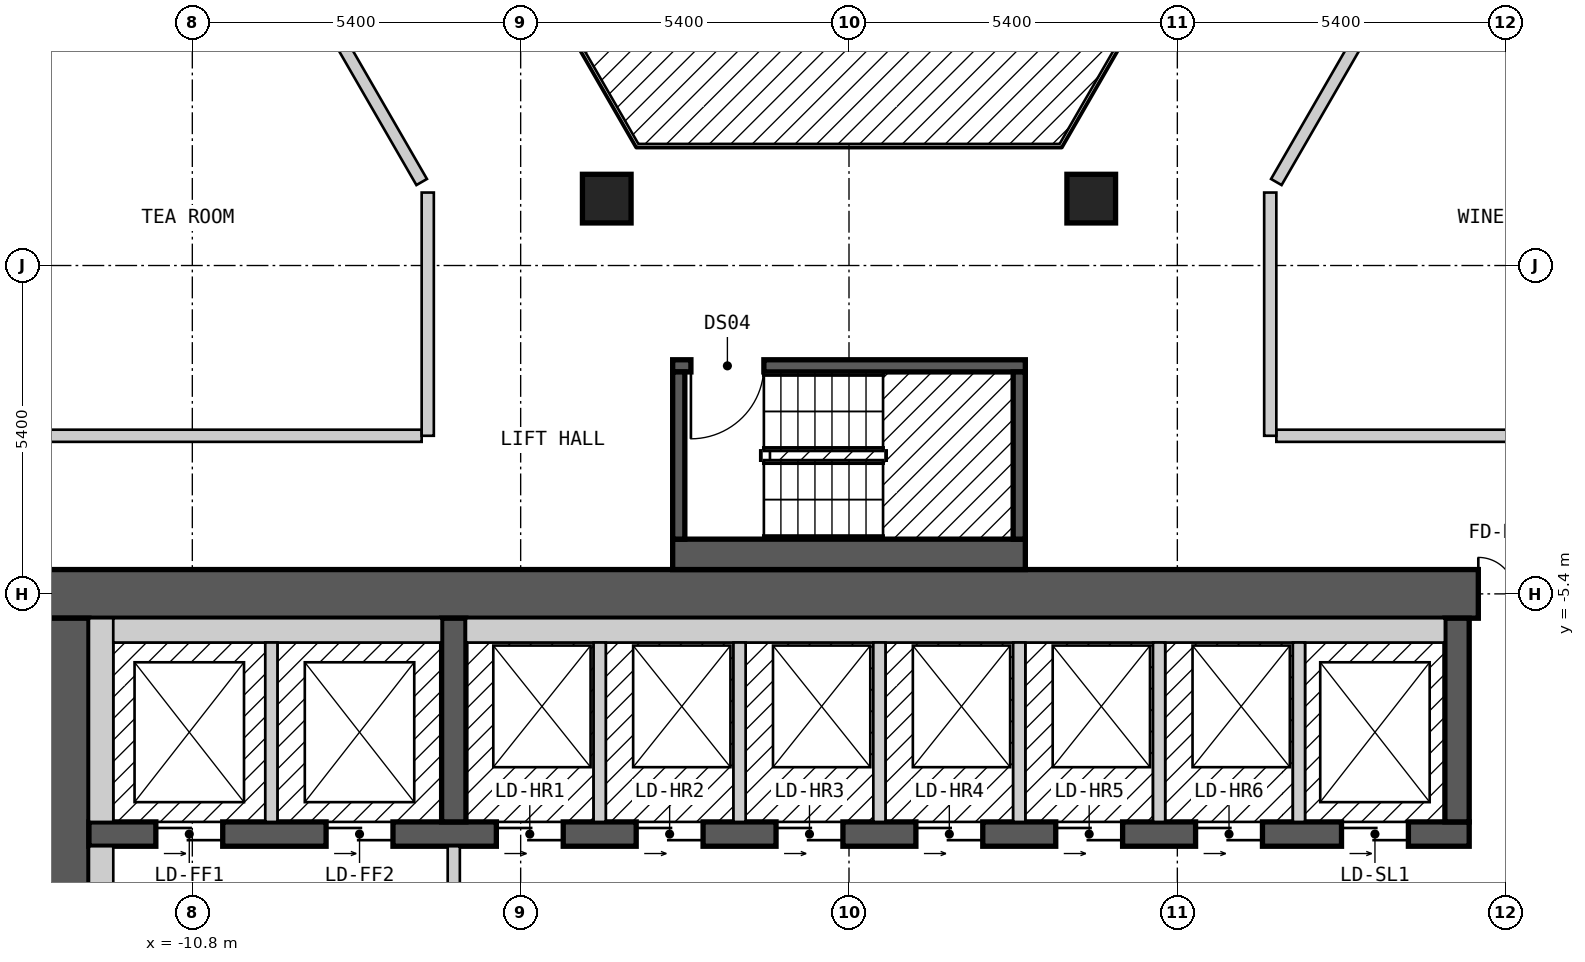
"""IFC4 building model, lengths in metres.
Left out: names, types, materials, properties, quantities, classifications, styles, units other than length and angle.
Written with IfcOpenShell. Run it as: python <this file> out.ifc"""

import sys

from ifc_helpers import new_model, si_unit, direction, frame, frame_2d, origin, origin_2d, place, context, subcontext, project, spatial, rectangle, extrude, element, fill, save


model = new_model("IFC4")
c1 = context("Model", 3, precision=1e-05, world=origin(), true_north=direction((0.0, 1.0)))
c2 = subcontext(c1, "Body", "Model", "MODEL_VIEW")
j1 = project(units=[si_unit("LENGTHUNIT", "METRE"), si_unit("PLANEANGLEUNIT", "RADIAN")], contexts=[c1])
p1 = place(None, origin())
s1 = spatial("IfcSite", under=j1, at=p1, CompositionType="ELEMENT")
p2 = place(p1, origin())
s2 = spatial("IfcBuilding", under=s1, at=p2, CompositionType="ELEMENT")
p3 = place(p2, frame((0.0, 0.0, 129.6)))
s3 = spatial("IfcBuildingStorey", under=s2, at=p3, CompositionType="ELEMENT", Elevation=129.6)
for number, where, z_axis, x_axis in (
    (1, (3.984, 1.1, 0.0), (0.0, 0.0, 1.0), (1.0, 0.0, 0.0)),
    (2, (-3.984, 1.1, 0.0), (0.0, 0.0, 1.0), (1.0, 0.0, 0.0)),
):
    element("IfcColumn", number, at=place(p3, frame(where, z_axis=z_axis, x_axis=x_axis)), inside=s3, PredefinedType="COLUMN", context=c2, shape_type="SweptSolid", body=[
        extrude(rectangle(XDim=0.8, YDim=0.8, at=origin_2d()), origin(), (0.0, 0.0, 1.0), 3.0),
    ])
p4 = place(p3, frame((-13.3, -5.4, 0.0), z_axis=(0.0, 0.0, 1.0), x_axis=(1.0, 0.0, 0.0)))
e3 = element("IfcWall", 3, at=p4, inside=s3, PredefinedType="SHEAR", context=c2, shape_type="SweptSolid", body=[
    extrude(rectangle(XDim=26.6, YDim=0.8, at=frame_2d((13.3, 0.0))), origin(), (0.0, 0.0, 1.0), 2.7),
])
p5 = place(p4, frame((23.65, 0.0, 0.0)))
e4 = element("IfcOpeningElement", 4, at=p5, cuts=e3, PredefinedType="OPENING", context=c2, shape_type="SweptSolid", body=[
    extrude(rectangle(XDim=1.2, YDim=2.1, at=frame_2d((0.6, 1.05))), frame((0.0, 0.41, 0.0), z_axis=(0.0, -1.0, 0.0), x_axis=(1.0, 0.0, 0.0)), (0.0, 0.0, 1.0), 0.82),
])
p6 = place(p3, frame((-12.9, -18.2, 0.0), z_axis=(0.0, 0.0, 1.0), x_axis=(0.0, 1.0, 0.0)))
e5 = element("IfcWall", 5, at=p6, inside=s3, PredefinedType="SHEAR", context=c2, shape_type="SweptSolid", body=[
    extrude(rectangle(XDim=12.4, YDim=0.8, at=frame_2d((6.2, 0.0))), origin(), (0.0, 0.0, 1.0), 2.7),
])
p7 = place(p6, frame((4.0, 0.0, 0.0)))
e6 = element("IfcOpeningElement", 6, at=p7, cuts=e5, PredefinedType="OPENING", context=c2, shape_type="SweptSolid", body=[
    extrude(rectangle(XDim=1.2, YDim=2.1, at=frame_2d((0.6, 1.05))), frame((0.0, 0.41, 0.0), z_axis=(0.0, -1.0, 0.0), x_axis=(1.0, 0.0, 0.0)), (0.0, 0.0, 1.0), 0.82),
])
p8 = place(p3, frame((-12.5, -9.35, 0.0), z_axis=(0.0, 0.0, 1.0), x_axis=(1.0, 0.0, 0.0)))
e7 = element("IfcWall", 7, at=p8, inside=s3, PredefinedType="SHEAR", context=c2, shape_type="SweptSolid", body=[
    extrude(rectangle(XDim=22.7, YDim=0.4, at=frame_2d((11.35, 0.0))), origin(), (0.0, 0.0, 1.0), 2.7),
])
p9 = place(p8, frame((1.1, 0.0, 0.0)))
e8 = element("IfcOpeningElement", 8, at=p9, cuts=e7, PredefinedType="OPENING", context=c2, shape_type="SweptSolid", body=[
    extrude(rectangle(XDim=1.1, YDim=2.1, at=frame_2d((0.55, 1.05))), frame((0.0, 0.21, 0.0), z_axis=(0.0, -1.0, 0.0), x_axis=(1.0, 0.0, 0.0)), (0.0, 0.0, 1.0), 0.42),
])
p10 = place(p8, frame((3.9, 0.0, 0.0)))
e9 = element("IfcOpeningElement", 9, at=p10, cuts=e7, PredefinedType="OPENING", context=c2, shape_type="SweptSolid", body=[
    extrude(rectangle(XDim=1.1, YDim=2.1, at=frame_2d((0.55, 1.05))), frame((0.0, 0.21, 0.0), z_axis=(0.0, -1.0, 0.0), x_axis=(1.0, 0.0, 0.0)), (0.0, 0.0, 1.0), 0.42),
])
p11 = place(p8, frame((6.7, 0.0, 0.0)))
e10 = element("IfcOpeningElement", 10, at=p11, cuts=e7, PredefinedType="OPENING", context=c2, shape_type="SweptSolid", body=[
    extrude(rectangle(XDim=1.1, YDim=2.1, at=frame_2d((0.55, 1.05))), frame((0.0, 0.21, 0.0), z_axis=(0.0, -1.0, 0.0), x_axis=(1.0, 0.0, 0.0)), (0.0, 0.0, 1.0), 0.42),
])
p12 = place(p8, frame((9.0, 0.0, 0.0)))
e11 = element("IfcOpeningElement", 11, at=p12, cuts=e7, PredefinedType="OPENING", context=c2, shape_type="SweptSolid", body=[
    extrude(rectangle(XDim=1.1, YDim=2.1, at=frame_2d((0.55, 1.05))), frame((0.0, 0.21, 0.0), z_axis=(0.0, -1.0, 0.0), x_axis=(1.0, 0.0, 0.0)), (0.0, 0.0, 1.0), 0.42),
])
p13 = place(p8, frame((11.3, 0.0, 0.0)))
e12 = element("IfcOpeningElement", 12, at=p13, cuts=e7, PredefinedType="OPENING", context=c2, shape_type="SweptSolid", body=[
    extrude(rectangle(XDim=1.1, YDim=2.1, at=frame_2d((0.55, 1.05))), frame((0.0, 0.21, 0.0), z_axis=(0.0, -1.0, 0.0), x_axis=(1.0, 0.0, 0.0)), (0.0, 0.0, 1.0), 0.42),
])
p14 = place(p8, frame((13.6, 0.0, 0.0)))
e13 = element("IfcOpeningElement", 13, at=p14, cuts=e7, PredefinedType="OPENING", context=c2, shape_type="SweptSolid", body=[
    extrude(rectangle(XDim=1.1, YDim=2.1, at=frame_2d((0.55, 1.05))), frame((0.0, 0.21, 0.0), z_axis=(0.0, -1.0, 0.0), x_axis=(1.0, 0.0, 0.0)), (0.0, 0.0, 1.0), 0.42),
])
p15 = place(p8, frame((15.9, 0.0, 0.0)))
e14 = element("IfcOpeningElement", 14, at=p15, cuts=e7, PredefinedType="OPENING", context=c2, shape_type="SweptSolid", body=[
    extrude(rectangle(XDim=1.1, YDim=2.1, at=frame_2d((0.55, 1.05))), frame((0.0, 0.21, 0.0), z_axis=(0.0, -1.0, 0.0), x_axis=(1.0, 0.0, 0.0)), (0.0, 0.0, 1.0), 0.42),
])
p16 = place(p8, frame((18.2, 0.0, 0.0)))
e15 = element("IfcOpeningElement", 15, at=p16, cuts=e7, PredefinedType="OPENING", context=c2, shape_type="SweptSolid", body=[
    extrude(rectangle(XDim=1.1, YDim=2.1, at=frame_2d((0.55, 1.05))), frame((0.0, 0.21, 0.0), z_axis=(0.0, -1.0, 0.0), x_axis=(1.0, 0.0, 0.0)), (0.0, 0.0, 1.0), 0.42),
])
p17 = place(p8, frame((20.6, 0.0, 0.0)))
e16 = element("IfcOpeningElement", 16, at=p17, cuts=e7, PredefinedType="OPENING", context=c2, shape_type="SweptSolid", body=[
    extrude(rectangle(XDim=1.1, YDim=2.1, at=frame_2d((0.55, 1.05))), frame((0.0, 0.21, 0.0), z_axis=(0.0, -1.0, 0.0), x_axis=(1.0, 0.0, 0.0)), (0.0, 0.0, 1.0), 0.42),
])
for number, where, z_axis, x_axis in (
    (17, (-6.5, -9.15, 0.0), (0.0, 0.0, 1.0), (0.0, 1.0, 0.0)),
    (18, (10.0, -9.15, 0.0), (0.0, 0.0, 1.0), (0.0, 1.0, 0.0)),
):
    element("IfcWall", number, at=place(p3, frame(where, z_axis=z_axis, x_axis=x_axis)), inside=s3, PredefinedType="SHEAR", context=c2, shape_type="SweptSolid", body=[
        extrude(rectangle(XDim=3.35, YDim=0.4, at=frame_2d((1.675, 0.0))), origin(), (0.0, 0.0, 1.0), 2.7),
    ])
p18 = place(p3, frame((-2.9, -4.75, 0.0), z_axis=(0.0, 0.0, 1.0), x_axis=(1.0, 0.0, 0.0)))
e19 = element("IfcWall", 19, at=p18, inside=s3, PredefinedType="SOLIDWALL", context=c2, shape_type="SweptSolid", body=[
    extrude(rectangle(XDim=5.8, YDim=0.5, at=frame_2d((2.9, 0.0))), origin(), (0.0, 0.0, 1.0), 2.7),
])
p19 = place(p3, frame((-2.9, -1.65, 0.0), z_axis=(0.0, 0.0, 1.0), x_axis=(1.0, 0.0, 0.0)))
e20 = element("IfcWall", 20, at=p19, inside=s3, PredefinedType="SOLIDWALL", context=c2, shape_type="SweptSolid", body=[
    extrude(rectangle(XDim=5.8, YDim=0.2, at=frame_2d((2.9, 0.0))), origin(), (0.0, 0.0, 1.0), 2.7),
])
p20 = place(p19, frame((0.3, 0.0, 0.0)))
e21 = element("IfcOpeningElement", 21, at=p20, cuts=e20, PredefinedType="OPENING", context=c2, shape_type="SweptSolid", body=[
    extrude(rectangle(XDim=1.2, YDim=2.1, at=frame_2d((0.6, 1.05))), frame((0.0, 0.11, 0.0), z_axis=(0.0, -1.0, 0.0), x_axis=(1.0, 0.0, 0.0)), (0.0, 0.0, 1.0), 0.22),
])
for number, where, z_axis, x_axis in (
    (22, (-2.8, -4.5, 0.0), (0.0, 0.0, 1.0), (0.0, 1.0, 0.0)),
    (23, (2.8, -4.5, 0.0), (0.0, 0.0, 1.0), (0.0, 1.0, 0.0)),
):
    element("IfcWall", number, at=place(p3, frame(where, z_axis=z_axis, x_axis=x_axis)), inside=s3, PredefinedType="SOLIDWALL", context=c2, shape_type="SweptSolid", body=[
        extrude(rectangle(XDim=2.75, YDim=0.2, at=frame_2d((1.375, 0.0))), origin(), (0.0, 0.0, 1.0), 2.7),
    ])
p21 = place(p3, frame((-10.796, 7.9, 0.0), z_axis=(0.0, 0.0, 1.0), x_axis=(0.499954271211, -0.866051803703, 0.0)))
e24 = element("IfcWall", 24, at=p21, inside=s3, PredefinedType="PARTITIONING", context=c2, shape_type="SweptSolid", body=[
    extrude(rectangle(XDim=7.536, YDim=0.2, at=frame_2d((3.768, 0.0))), origin(), (0.0, 0.0, 1.0), 2.7),
])
p22 = place(p3, frame((7.967, 13.0, 0.0), z_axis=(0.0, 0.0, 1.0), x_axis=(0.50003774998, -0.866003607726, 0.0)))
e25 = element("IfcWall", 25, at=p22, inside=s3, PredefinedType="PARTITIONING", context=c2, shape_type="SweptSolid", body=[
    extrude(rectangle(XDim=14.433, YDim=0.2, at=frame_2d((7.217, 0.0))), origin(), (0.0, 0.0, 1.0), 2.7),
])
p23 = place(p22, frame((6.824, 0.0, 0.0)))
e26 = element("IfcOpeningElement", 26, at=p23, cuts=e25, PredefinedType="OPENING", context=c2, shape_type="SweptSolid", body=[
    extrude(rectangle(XDim=0.9, YDim=2.1, at=frame_2d((0.45, 1.05))), frame((0.0, 0.11, 0.0), z_axis=(0.0, -1.0, 0.0), x_axis=(1.0, 0.0, 0.0)), (0.0, 0.0, 1.0), 0.22),
])
p24 = place(p3, frame((9.296, 15.1, 0.0), z_axis=(0.0, 0.0, 1.0), x_axis=(0.499974024244, -0.866040400375, 0.0)))
e27 = element("IfcWall", 27, at=p24, inside=s3, PredefinedType="PARTITIONING", context=c2, shape_type="SweptSolid", body=[
    extrude(rectangle(XDim=16.857, YDim=0.2, at=frame_2d((8.429, 0.0))), origin(), (0.0, 0.0, 1.0), 2.7),
])
p25 = place(p24, frame((5.187, 0.0, 0.0)))
e28 = element("IfcOpeningElement", 28, at=p25, cuts=e27, PredefinedType="OPENING", context=c2, shape_type="SweptSolid", body=[
    extrude(rectangle(XDim=1.0, YDim=2.1, at=frame_2d((0.5, 1.05))), frame((0.0, 0.11, 0.0), z_axis=(0.0, -1.0, 0.0), x_axis=(1.0, 0.0, 0.0)), (0.0, 0.0, 1.0), 0.22),
])
p26 = place(p3, frame((-13.395, -2.8, 0.0), z_axis=(0.0, 0.0, 1.0), x_axis=(1.0, 0.0, 0.0)))
e29 = element("IfcWall", 29, at=p26, inside=s3, PredefinedType="PARTITIONING", context=c2, shape_type="SweptSolid", body=[
    extrude(rectangle(XDim=6.367, YDim=0.2, at=frame_2d((3.184, 0.0))), origin(), (0.0, 0.0, 1.0), 2.7),
])
p27 = place(p3, frame((7.028, -2.8, 0.0), z_axis=(0.0, 0.0, 1.0), x_axis=(1.0, 0.0, 0.0)))
e30 = element("IfcWall", 30, at=p27, inside=s3, PredefinedType="PARTITIONING", context=c2, shape_type="SweptSolid", body=[
    extrude(rectangle(XDim=6.25, YDim=0.2, at=frame_2d((3.125, 0.0))), origin(), (0.0, 0.0, 1.0), 2.7),
])
p28 = place(p3, frame((7.028, 1.373, 0.0), z_axis=(0.0, 0.0, 1.0), x_axis=(0.499954271211, 0.866051803703, 0.0)))
e31 = element("IfcWall", 31, at=p28, inside=s3, PredefinedType="PARTITIONING", context=c2, shape_type="SweptSolid", body=[
    extrude(rectangle(XDim=7.536, YDim=0.2, at=frame_2d((3.768, 0.0))), origin(), (0.0, 0.0, 1.0), 2.7),
])
p29 = place(p3, frame((-15.242, 0.399, 0.0), z_axis=(0.0, 0.0, 1.0), x_axis=(0.499953615651, 0.866052182145, 0.0)))
e32 = element("IfcWall", 32, at=p29, inside=s3, PredefinedType="PARTITIONING", context=c2, shape_type="SweptSolid", body=[
    extrude(rectangle(XDim=8.777, YDim=0.2, at=frame_2d((4.388, 0.0))), origin(), (0.0, 0.0, 1.0), 2.7),
])
p30 = place(p29, frame((3.938, 0.0, 0.0)))
e33 = element("IfcOpeningElement", 33, at=p30, cuts=e32, PredefinedType="OPENING", context=c2, shape_type="SweptSolid", body=[
    extrude(rectangle(XDim=0.9, YDim=2.1, at=frame_2d((0.45, 1.05))), frame((0.0, 0.11, 0.0), z_axis=(0.0, -1.0, 0.0), x_axis=(1.0, 0.0, 0.0)), (0.0, 0.0, 1.0), 0.22),
])
p31 = place(p3, frame((-17.753, 0.45, 0.0), z_axis=(0.0, 0.0, 1.0), x_axis=(0.499988552313, 0.866032013009, 0.0)))
e34 = element("IfcWall", 34, at=p31, inside=s3, PredefinedType="PARTITIONING", context=c2, shape_type="SweptSolid", body=[
    extrude(rectangle(XDim=16.917, YDim=0.2, at=frame_2d((8.458, 0.0))), origin(), (0.0, 0.0, 1.0), 2.7),
])
p32 = place(p31, frame((10.73, 0.0, 0.0)))
e35 = element("IfcOpeningElement", 35, at=p32, cuts=e34, PredefinedType="OPENING", context=c2, shape_type="SweptSolid", body=[
    extrude(rectangle(XDim=1.0, YDim=2.1, at=frame_2d((0.5, 1.05))), frame((0.0, 0.11, 0.0), z_axis=(0.0, -1.0, 0.0), x_axis=(1.0, 0.0, 0.0)), (0.0, 0.0, 1.0), 0.22),
])
p33 = place(p31, frame((0.594, 0.0, 0.0)))
e36 = element("IfcOpeningElement", 36, at=p33, cuts=e34, PredefinedType="OPENING", context=c2, shape_type="SweptSolid", body=[
    extrude(rectangle(XDim=1.0, YDim=2.1, at=frame_2d((0.5, 1.05))), frame((0.0, 0.11, 0.0), z_axis=(0.0, -1.0, 0.0), x_axis=(1.0, 0.0, 0.0)), (0.0, 0.0, 1.0), 0.22),
])
for number, where, z_axis, x_axis in (
    (37, (6.928, -2.8, 0.0), (0.0, 0.0, 1.0), (0.0, 1.0, 0.0)),
    (38, (-6.928, -2.8, 0.0), (0.0, 0.0, 1.0), (0.0, 1.0, 0.0)),
):
    element("IfcWall", number, at=place(p3, frame(where, z_axis=z_axis, x_axis=x_axis)), inside=s3, PredefinedType="PARTITIONING", context=c2, shape_type="SweptSolid", body=[
        extrude(rectangle(XDim=4.0, YDim=0.2, at=frame_2d((2.0, 0.0))), origin(), (0.0, 0.0, 1.0), 2.7),
    ])
p34 = place(p3, frame((-12.3, -13.0, 0.0), z_axis=(0.0, 0.0, 1.0), x_axis=(0.0, 1.0, 0.0)))
e39 = element("IfcWall", 39, at=p34, inside=s3, PredefinedType="PARTITIONING", context=c2, shape_type="SweptSolid", body=[
    extrude(rectangle(XDim=3.45, YDim=0.4, at=frame_2d((1.725, 0.0))), origin(), (0.0, 0.0, 1.0), 2.7),
])
p35 = place(p3, frame((-12.3, -9.15, 0.0), z_axis=(0.0, 0.0, 1.0), x_axis=(0.0, 1.0, 0.0)))
e40 = element("IfcWall", 40, at=p35, inside=s3, PredefinedType="SOLIDWALL", context=c2, shape_type="SweptSolid", body=[
    extrude(rectangle(XDim=3.35, YDim=0.4, at=frame_2d((1.675, 0.0))), origin(), (0.0, 0.0, 1.0), 2.7),
])
p36 = place(p3, frame((-12.1, -6.0, 0.0), z_axis=(0.0, 0.0, 1.0), x_axis=(1.0, 0.0, 0.0)))
e41 = element("IfcWall", 41, at=p36, inside=s3, PredefinedType="SOLIDWALL", context=c2, shape_type="SweptSolid", body=[
    extrude(rectangle(XDim=5.4, YDim=0.4, at=frame_2d((2.7, 0.0))), origin(), (0.0, 0.0, 1.0), 2.7),
])
p37 = place(p3, frame((-9.5, -9.15, 0.0), z_axis=(0.0, 0.0, 1.0), x_axis=(0.0, 1.0, 0.0)))
e42 = element("IfcWall", 42, at=p37, inside=s3, PredefinedType="SOLIDWALL", context=c2, shape_type="SweptSolid", body=[
    extrude(rectangle(XDim=2.95, YDim=0.2, at=frame_2d((1.475, 0.0))), origin(), (0.0, 0.0, 1.0), 2.7),
])
p38 = place(p3, frame((-6.5, -14.45, 0.0), z_axis=(0.0, 0.0, 1.0), x_axis=(0.0, 1.0, 0.0)))
e43 = element("IfcWall", 43, at=p38, inside=s3, PredefinedType="PARTITIONING", context=c2, shape_type="SweptSolid", body=[
    extrude(rectangle(XDim=4.9, YDim=0.2, at=frame_2d((2.45, 0.0))), origin(), (0.0, 0.0, 1.0), 2.7),
])
p39 = place(p38, frame((3.15, 0.0, 0.0), z_axis=(0.0, 0.0, 1.0), x_axis=(-1.0, 0.0, 0.0)))
e44 = element("IfcOpeningElement", 44, at=p39, cuts=e43, PredefinedType="OPENING", context=c2, shape_type="SweptSolid", body=[
    extrude(rectangle(XDim=1.4, YDim=2.1, at=frame_2d((0.7, 1.05))), frame((0.0, 0.11, 0.0), z_axis=(0.0, -1.0, 0.0), x_axis=(1.0, 0.0, 0.0)), (0.0, 0.0, 1.0), 0.22),
])
p40 = place(p3, frame((-6.3, -6.0, 0.0), z_axis=(0.0, 0.0, 1.0), x_axis=(1.0, 0.0, 0.0)))
e45 = element("IfcWall", 45, at=p40, inside=s3, PredefinedType="SOLIDWALL", context=c2, shape_type="SweptSolid", body=[
    extrude(rectangle(XDim=16.1, YDim=0.4, at=frame_2d((8.05, 0.0))), origin(), (0.0, 0.0, 1.0), 2.7),
])
for number, where, z_axis, x_axis in (
    (46, (-4.1, -9.15, 0.0), (0.0, 0.0, 1.0), (0.0, 1.0, 0.0)),
    (47, (-1.8, -9.15, 0.0), (0.0, 0.0, 1.0), (0.0, 1.0, 0.0)),
    (48, (0.5, -9.15, 0.0), (0.0, 0.0, 1.0), (0.0, 1.0, 0.0)),
    (49, (2.8, -9.15, 0.0), (0.0, 0.0, 1.0), (0.0, 1.0, 0.0)),
    (50, (5.1, -9.15, 0.0), (0.0, 0.0, 1.0), (0.0, 1.0, 0.0)),
    (51, (7.4, -9.15, 0.0), (0.0, 0.0, 1.0), (0.0, 1.0, 0.0)),
):
    element("IfcWall", number, at=place(p3, frame(where, z_axis=z_axis, x_axis=x_axis)), inside=s3, PredefinedType="SOLIDWALL", context=c2, shape_type="SweptSolid", body=[
        extrude(rectangle(XDim=2.95, YDim=0.2, at=frame_2d((1.475, 0.0))), origin(), (0.0, 0.0, 1.0), 2.7),
    ])
p41 = place(p20, origin())
e52 = element("IfcDoor", 52, at=p41, inside=s3, OperationType="SINGLE_SWING_LEFT", PredefinedType="DOOR", context=c2, shape_type="SweptSolid", body=[
    extrude(rectangle(XDim=1.2, YDim=2.1, at=frame_2d((0.6, 1.05))), frame((0.0, 0.025, 0.0), z_axis=(0.0, -1.0, 0.0), x_axis=(1.0, 0.0, 0.0)), (0.0, 0.0, 1.0), 0.05),
])
fill(e21, e52)
p42 = place(p9, origin())
e53 = element("IfcDoor", 53, at=p42, inside=s3, OperationType="DOUBLE_DOOR_SLIDING", PredefinedType="DOOR", context=c2, shape_type="SweptSolid", body=[
    extrude(rectangle(XDim=1.1, YDim=2.1, at=frame_2d((0.55, 1.05))), frame((0.0, 0.025, 0.0), z_axis=(0.0, -1.0, 0.0), x_axis=(1.0, 0.0, 0.0)), (0.0, 0.0, 1.0), 0.05),
])
fill(e8, e53)
p43 = place(p10, origin())
e54 = element("IfcDoor", 54, at=p43, inside=s3, OperationType="DOUBLE_DOOR_SLIDING", PredefinedType="DOOR", context=c2, shape_type="SweptSolid", body=[
    extrude(rectangle(XDim=1.1, YDim=2.1, at=frame_2d((0.55, 1.05))), frame((0.0, 0.025, 0.0), z_axis=(0.0, -1.0, 0.0), x_axis=(1.0, 0.0, 0.0)), (0.0, 0.0, 1.0), 0.05),
])
fill(e9, e54)
p44 = place(p11, origin())
e55 = element("IfcDoor", 55, at=p44, inside=s3, OperationType="DOUBLE_DOOR_SLIDING", PredefinedType="DOOR", context=c2, shape_type="SweptSolid", body=[
    extrude(rectangle(XDim=1.1, YDim=2.1, at=frame_2d((0.55, 1.05))), frame((0.0, 0.025, 0.0), z_axis=(0.0, -1.0, 0.0), x_axis=(1.0, 0.0, 0.0)), (0.0, 0.0, 1.0), 0.05),
])
fill(e10, e55)
p45 = place(p12, origin())
e56 = element("IfcDoor", 56, at=p45, inside=s3, OperationType="DOUBLE_DOOR_SLIDING", PredefinedType="DOOR", context=c2, shape_type="SweptSolid", body=[
    extrude(rectangle(XDim=1.1, YDim=2.1, at=frame_2d((0.55, 1.05))), frame((0.0, 0.025, 0.0), z_axis=(0.0, -1.0, 0.0), x_axis=(1.0, 0.0, 0.0)), (0.0, 0.0, 1.0), 0.05),
])
fill(e11, e56)
p46 = place(p13, origin())
e57 = element("IfcDoor", 57, at=p46, inside=s3, OperationType="DOUBLE_DOOR_SLIDING", PredefinedType="DOOR", context=c2, shape_type="SweptSolid", body=[
    extrude(rectangle(XDim=1.1, YDim=2.1, at=frame_2d((0.55, 1.05))), frame((0.0, 0.025, 0.0), z_axis=(0.0, -1.0, 0.0), x_axis=(1.0, 0.0, 0.0)), (0.0, 0.0, 1.0), 0.05),
])
fill(e12, e57)
p47 = place(p14, origin())
e58 = element("IfcDoor", 58, at=p47, inside=s3, OperationType="DOUBLE_DOOR_SLIDING", PredefinedType="DOOR", context=c2, shape_type="SweptSolid", body=[
    extrude(rectangle(XDim=1.1, YDim=2.1, at=frame_2d((0.55, 1.05))), frame((0.0, 0.025, 0.0), z_axis=(0.0, -1.0, 0.0), x_axis=(1.0, 0.0, 0.0)), (0.0, 0.0, 1.0), 0.05),
])
fill(e13, e58)
p48 = place(p15, origin())
e59 = element("IfcDoor", 59, at=p48, inside=s3, OperationType="DOUBLE_DOOR_SLIDING", PredefinedType="DOOR", context=c2, shape_type="SweptSolid", body=[
    extrude(rectangle(XDim=1.1, YDim=2.1, at=frame_2d((0.55, 1.05))), frame((0.0, 0.025, 0.0), z_axis=(0.0, -1.0, 0.0), x_axis=(1.0, 0.0, 0.0)), (0.0, 0.0, 1.0), 0.05),
])
fill(e14, e59)
p49 = place(p16, origin())
e60 = element("IfcDoor", 60, at=p49, inside=s3, OperationType="DOUBLE_DOOR_SLIDING", PredefinedType="DOOR", context=c2, shape_type="SweptSolid", body=[
    extrude(rectangle(XDim=1.1, YDim=2.1, at=frame_2d((0.55, 1.05))), frame((0.0, 0.025, 0.0), z_axis=(0.0, -1.0, 0.0), x_axis=(1.0, 0.0, 0.0)), (0.0, 0.0, 1.0), 0.05),
])
fill(e15, e60)
p50 = place(p17, origin())
e61 = element("IfcDoor", 61, at=p50, inside=s3, OperationType="DOUBLE_DOOR_SLIDING", PredefinedType="DOOR", context=c2, shape_type="SweptSolid", body=[
    extrude(rectangle(XDim=1.1, YDim=2.1, at=frame_2d((0.55, 1.05))), frame((0.0, 0.025, 0.0), z_axis=(0.0, -1.0, 0.0), x_axis=(1.0, 0.0, 0.0)), (0.0, 0.0, 1.0), 0.05),
])
fill(e16, e61)
p51 = place(p5, origin())
e62 = element("IfcDoor", 62, at=p51, inside=s3, OperationType="DOUBLE_DOOR_SINGLE_SWING", PredefinedType="DOOR", context=c2, shape_type="SweptSolid", body=[
    extrude(rectangle(XDim=1.2, YDim=2.1, at=frame_2d((0.6, 1.05))), frame((0.0, 0.025, 0.0), z_axis=(0.0, -1.0, 0.0), x_axis=(1.0, 0.0, 0.0)), (0.0, 0.0, 1.0), 0.05),
])
fill(e4, e62)
save(model, sys.argv[1])
